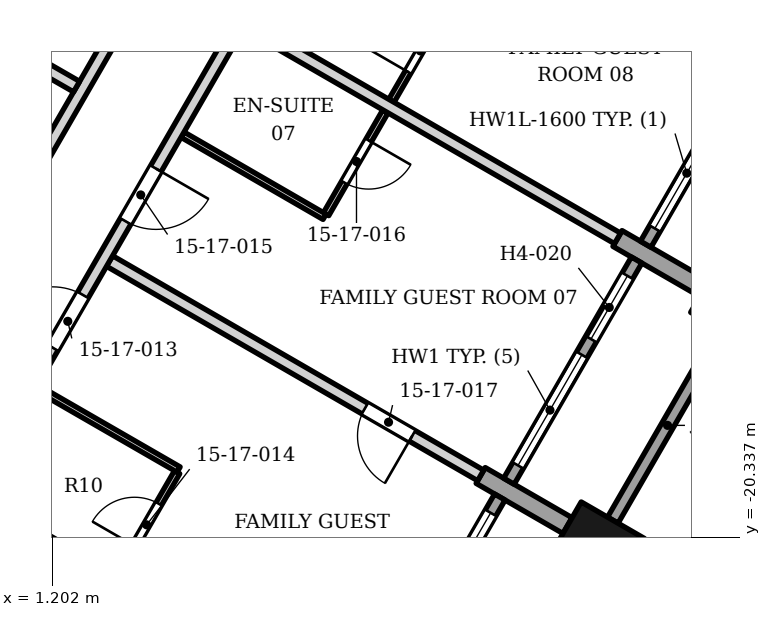
"""IFC4 building model, lengths in metres.
Left out: names, types, materials, properties, quantities, classifications, styles, units other than length and angle.
Written with IfcOpenShell. Run it as: python <this file> out.ifc"""

import sys

from ifc_helpers import new_model, si_unit, direction, frame, frame_2d, origin, origin_2d, place, context, subcontext, project, spatial, rectangle, extrude, element, fill, save


model = new_model("IFC4")
c1 = context("Model", 3, precision=1e-05, world=origin(), true_north=direction((0.0, 1.0)))
c2 = subcontext(c1, "Body", "Model", "MODEL_VIEW")
j1 = project(units=[si_unit("LENGTHUNIT", "METRE"), si_unit("PLANEANGLEUNIT", "RADIAN")], contexts=[c1])
p1 = place(None, origin())
s1 = spatial("IfcSite", under=j1, at=p1, CompositionType="ELEMENT")
p2 = place(p1, origin())
s2 = spatial("IfcBuilding", under=s1, at=p2, CompositionType="ELEMENT")
p3 = place(p2, frame((0.0, 0.0, 76.6)))
s3 = spatial("IfcBuildingStorey", under=s2, at=p3, CompositionType="ELEMENT", Elevation=76.6)
p4 = place(p3, frame((10.197, -20.443, 0.0), z_axis=(0.0, 0.0, 1.0), x_axis=(0.5, 0.866025403784, 0.0)))
e1 = element("IfcColumn", 1, at=p4, inside=s3, PredefinedType="COLUMN", context=c2, shape_type="SweptSolid", body=[
    extrude(rectangle(XDim=0.9, YDim=1.2, at=origin_2d()), origin(), (0.0, 0.0, 1.0), 3.4),
])
p5 = place(p3, frame((9.678, -20.143, 0.0), z_axis=(0.0, 0.0, 1.0), x_axis=(-0.866003217194, 0.500038426333, 0.0)))
e2 = element("IfcWall", 2, at=p5, inside=s3, PredefinedType="SOLIDWALL", context=c2, shape_type="SweptSolid", body=[
    extrude(rectangle(XDim=1.65, YDim=0.3, at=frame_2d((0.825, 0.0))), origin(), (0.0, 0.0, 1.0), 2.628),
])
p6 = place(p3, frame((11.928, -16.245, 0.0), z_axis=(0.0, 0.0, 1.0), x_axis=(0.865955154139, -0.50012165622, 0.0)))
e3 = element("IfcWall", 3, at=p6, inside=s3, PredefinedType="SOLIDWALL", context=c2, shape_type="SweptSolid", body=[
    extrude(rectangle(XDim=1.2, YDim=0.9, at=frame_2d((0.6, 0.0))), origin(), (0.0, 0.0, 1.0), 2.63),
])
p7 = place(p3, frame((10.499, -15.42, 0.0), z_axis=(0.0, 0.0, 1.0), x_axis=(0.866040211805, -0.499974350878, 0.0)))
e4 = element("IfcWall", 4, at=p7, inside=s3, PredefinedType="SOLIDWALL", context=c2, shape_type="SweptSolid", body=[
    extrude(rectangle(XDim=1.65, YDim=0.3, at=frame_2d((0.825, 0.0))), origin(), (0.0, 0.0, 1.0), 2.65),
])
p8 = place(p3, frame((6.464, -23.31, 0.0), z_axis=(0.0, 0.0, 1.0), x_axis=(0.500002543286, 0.866023935413, 0.0)))
e5 = element("IfcWall", 5, at=p8, inside=s3, PredefinedType="ELEMENTEDWALL", context=c2, shape_type="SweptSolid", body=[
    extrude(rectangle(XDim=4.2, YDim=0.2, at=frame_2d((2.1, 0.0))), origin(), (0.0, 0.0, 1.0), 2.473),
])
p9 = place(p8, frame((0.3, 0.0, 0.6)))
e6 = element("IfcOpeningElement", 6, at=p9, cuts=e5, PredefinedType="OPENING", context=c2, shape_type="SweptSolid", body=[
    extrude(rectangle(XDim=2.1, YDim=1.77, at=frame_2d((1.05, 0.885))), frame((0.0, 0.11, 0.0), z_axis=(0.0, -1.0, 0.0), x_axis=(1.0, 0.0, 0.0)), (0.0, 0.0, 1.0), 0.22),
])
p10 = place(p8, frame((2.7, 0.0, 0.0)))
e7 = element("IfcOpeningElement", 7, at=p10, cuts=e5, PredefinedType="OPENING", context=c2, shape_type="SweptSolid", body=[
    extrude(rectangle(XDim=1.2, YDim=2.37, at=frame_2d((0.6, 1.185))), frame((0.0, 0.11, 0.0), z_axis=(0.0, -1.0, 0.0), x_axis=(1.0, 0.0, 0.0)), (0.0, 0.0, 1.0), 0.22),
])
p11 = place(p3, frame((10.422, -20.053, 0.0), z_axis=(0.0, 0.0, 1.0), x_axis=(0.500012057535, 0.866018442252, 0.0)))
e8 = element("IfcWall", 8, at=p11, inside=s3, PredefinedType="SOLIDWALL", context=c2, shape_type="SweptSolid", body=[
    extrude(rectangle(XDim=3.6, YDim=0.2, at=frame_2d((1.8, 0.0))), origin(), (0.0, 0.0, 1.0), 2.63),
])
p12 = place(p3, frame((8.714, -19.413, 0.0), z_axis=(0.0, 0.0, 1.0), x_axis=(0.500027713859, 0.866009402589, 0.0)))
e9 = element("IfcWall", 9, at=p12, inside=s3, PredefinedType="ELEMENTEDWALL", context=c2, shape_type="SweptSolid", body=[
    extrude(rectangle(XDim=4.2, YDim=0.2, at=frame_2d((2.1, 0.0))), origin(), (0.0, 0.0, 1.0), 2.628),
])
p13 = place(p12, frame((0.3, 0.0, 0.6)))
e10 = element("IfcOpeningElement", 10, at=p13, cuts=e9, PredefinedType="OPENING", context=c2, shape_type="SweptSolid", body=[
    extrude(rectangle(XDim=2.1, YDim=1.8, at=frame_2d((1.05, 0.9))), frame((0.0, 0.11, 0.0), z_axis=(0.0, -1.0, 0.0), x_axis=(1.0, 0.0, 0.0)), (0.0, 0.0, 1.0), 0.22),
])
p14 = place(p12, frame((2.7, 0.0, 0.0)))
e11 = element("IfcOpeningElement", 11, at=p14, cuts=e9, PredefinedType="OPENING", context=c2, shape_type="SweptSolid", body=[
    extrude(rectangle(XDim=1.2, YDim=2.4, at=frame_2d((0.6, 1.2))), frame((0.0, 0.11, 0.0), z_axis=(0.0, -1.0, 0.0), x_axis=(1.0, 0.0, 0.0)), (0.0, 0.0, 1.0), 0.22),
])
p15 = place(p3, frame((10.964, -15.516, 0.0), z_axis=(0.0, 0.0, 1.0), x_axis=(0.500002543286, 0.866023935413, 0.0)))
e12 = element("IfcWall", 12, at=p15, inside=s3, PredefinedType="ELEMENTEDWALL", context=c2, shape_type="SweptSolid", body=[
    extrude(rectangle(XDim=4.2, YDim=0.2, at=frame_2d((2.1, 0.0))), origin(), (0.0, 0.0, 1.0), 2.302),
])
p16 = place(p15, frame((0.3, 0.0, 0.6)))
e13 = element("IfcOpeningElement", 13, at=p16, cuts=e12, PredefinedType="OPENING", context=c2, shape_type="SweptSolid", body=[
    extrude(rectangle(XDim=2.1, YDim=1.6, at=frame_2d((1.05, 0.8))), frame((0.0, 0.11, 0.0), z_axis=(0.0, -1.0, 0.0), x_axis=(1.0, 0.0, 0.0)), (0.0, 0.0, 1.0), 0.22),
])
p17 = place(p15, frame((2.7, 0.0, 0.0)))
e14 = element("IfcOpeningElement", 14, at=p17, cuts=e12, PredefinedType="OPENING", context=c2, shape_type="SweptSolid", body=[
    extrude(rectangle(XDim=1.2, YDim=2.2, at=frame_2d((0.6, 1.1))), frame((0.0, 0.11, 0.0), z_axis=(0.0, -1.0, 0.0), x_axis=(1.0, 0.0, 0.0)), (0.0, 0.0, 1.0), 0.22),
])
p18 = place(p3, frame((2.28, -20.952, 0.0), z_axis=(0.0, 0.0, 1.0), x_axis=(0.500675951608, 0.865634791053, 0.0)))
e15 = element("IfcWall", 15, at=p18, inside=s3, PredefinedType="PARTITIONING", context=c2, shape_type="SweptSolid", body=[
    extrude(rectangle(XDim=1.95, YDim=0.1, at=frame_2d((0.975, 0.0))), origin(), (0.0, 0.0, 1.0), 2.384),
])
p19 = place(p18, frame((0.55, 0.0, 0.0)))
e16 = element("IfcOpeningElement", 16, at=p19, cuts=e15, PredefinedType="OPENING", context=c2, shape_type="SweptSolid", body=[
    extrude(rectangle(XDim=0.8, YDim=2.1, at=frame_2d((0.4, 1.05))), frame((0.0, 0.06, 0.0), z_axis=(0.0, -1.0, 0.0), x_axis=(1.0, 0.0, 0.0)), (0.0, 0.0, 1.0), 0.12),
])
p20 = place(p3, frame((-0.193, -19.64, 0.0), z_axis=(0.0, 0.0, 1.0), x_axis=(0.866036131362, -0.49998141883, 0.0)))
e17 = element("IfcWall", 17, at=p20, inside=s3, PredefinedType="PARTITIONING", context=c2, shape_type="SweptSolid", body=[
    extrude(rectangle(XDim=2.802, YDim=0.2, at=frame_2d((1.401, 0.0))), origin(), (0.0, 0.0, 1.0), 2.384),
])
p21 = place(p3, frame((0.943, -17.873, 0.0), z_axis=(0.0, 0.0, 1.0), x_axis=(0.866339109022, -0.499456252518, 0.0)))
e18 = element("IfcWall", 18, at=p21, inside=s3, PredefinedType="PARTITIONING", context=c2, shape_type="SweptSolid", body=[
    extrude(rectangle(XDim=2.7, YDim=0.1, at=frame_2d((1.35, 0.0))), origin(), (0.0, 0.0, 1.0), 2.384),
])
p22 = place(p3, frame((-0.029, -15.955, 0.0), z_axis=(0.0, 0.0, 1.0), x_axis=(0.499541892375, 0.866289730842, 0.0)))
e19 = element("IfcWall", 19, at=p22, inside=s3, PredefinedType="PARTITIONING", context=c2, shape_type="SweptSolid", body=[
    extrude(rectangle(XDim=13.93, YDim=0.2, at=frame_2d((6.965, 0.0))), origin(), (0.0, 0.0, 1.0), 2.242),
])
p23 = place(p22, frame((1.27, 0.0, 0.0)))
e20 = element("IfcOpeningElement", 20, at=p23, cuts=e19, PredefinedType="OPENING", context=c2, shape_type="SweptSolid", body=[
    extrude(rectangle(XDim=0.9, YDim=2.1, at=frame_2d((0.45, 1.05))), frame((0.0, 0.11, 0.0), z_axis=(0.0, -1.0, 0.0), x_axis=(1.0, 0.0, 0.0)), (0.0, 0.0, 1.0), 0.22),
])
p24 = place(p22, frame((8.235, 0.0, 0.0)))
e21 = element("IfcOpeningElement", 21, at=p24, cuts=e19, PredefinedType="OPENING", context=c2, shape_type="SweptSolid", body=[
    extrude(rectangle(XDim=0.9, YDim=2.1, at=frame_2d((0.45, 1.05))), frame((0.0, 0.11, 0.0), z_axis=(0.0, -1.0, 0.0), x_axis=(1.0, 0.0, 0.0)), (0.0, 0.0, 1.0), 0.22),
])
p25 = place(p3, frame((2.145, -15.791, 0.0), z_axis=(0.0, 0.0, 1.0), x_axis=(0.865906406618, -0.500206052519, 0.0)))
e22 = element("IfcWall", 22, at=p25, inside=s3, PredefinedType="PARTITIONING", context=c2, shape_type="SweptSolid", body=[
    extrude(rectangle(XDim=7.05, YDim=0.2, at=frame_2d((3.525, 0.0))), origin(), (0.0, 0.0, 1.0), 2.384),
])
p26 = place(p25, frame((4.85, 0.0, 0.0)))
e23 = element("IfcOpeningElement", 23, at=p26, cuts=e22, PredefinedType="OPENING", context=c2, shape_type="SweptSolid", body=[
    extrude(rectangle(XDim=0.9, YDim=2.1, at=frame_2d((0.45, 1.05))), frame((0.0, 0.11, 0.0), z_axis=(0.0, -1.0, 0.0), x_axis=(1.0, 0.0, 0.0)), (0.0, 0.0, 1.0), 0.22),
])
p27 = place(p3, frame((5.707, -15.021, 0.0), z_axis=(0.0, 0.0, 1.0), x_axis=(0.49995005938, 0.866054235095, 0.0)))
e24 = element("IfcWall", 24, at=p27, inside=s3, PredefinedType="PARTITIONING", context=c2, shape_type="SweptSolid", body=[
    extrude(rectangle(XDim=1.95, YDim=0.1, at=frame_2d((0.975, 0.0))), origin(), (0.0, 0.0, 1.0), 2.473),
])
p28 = place(p27, frame((0.6, 0.0, 0.0)))
e25 = element("IfcOpeningElement", 25, at=p28, cuts=e24, PredefinedType="OPENING", context=c2, shape_type="SweptSolid", body=[
    extrude(rectangle(XDim=0.8, YDim=2.1, at=frame_2d((0.4, 1.05))), frame((0.0, 0.06, 0.0), z_axis=(0.0, -1.0, 0.0), x_axis=(1.0, 0.0, 0.0)), (0.0, 0.0, 1.0), 0.12),
])
p29 = place(p3, frame((3.344, -13.713, 0.0), z_axis=(0.0, 0.0, 1.0), x_axis=(0.86571095196, -0.500544251447, 0.0)))
e26 = element("IfcWall", 26, at=p29, inside=s3, PredefinedType="PARTITIONING", context=c2, shape_type="SweptSolid", body=[
    extrude(rectangle(XDim=2.7, YDim=0.1, at=frame_2d((1.35, 0.0))), origin(), (0.0, 0.0, 1.0), 2.384),
])
p30 = place(p3, frame((6.781, -13.158, 0.0), z_axis=(0.0, 0.0, 1.0), x_axis=(0.50063639091, 0.865657671425, 0.0)))
e27 = element("IfcWall", 27, at=p30, inside=s3, PredefinedType="PARTITIONING", context=c2, shape_type="SweptSolid", body=[
    extrude(rectangle(XDim=1.95, YDim=0.1, at=frame_2d((0.975, 0.0))), origin(), (0.0, 0.0, 1.0), 2.242),
])
p31 = place(p30, frame((0.55, 0.0, 0.0)))
e28 = element("IfcOpeningElement", 28, at=p31, cuts=e27, PredefinedType="OPENING", context=c2, shape_type="SweptSolid", body=[
    extrude(rectangle(XDim=0.8, YDim=2.1, at=frame_2d((0.4, 1.05))), frame((0.0, 0.06, 0.0), z_axis=(0.0, -1.0, 0.0), x_axis=(1.0, 0.0, 0.0)), (0.0, 0.0, 1.0), 0.12),
])
p32 = place(p3, frame((0.85, -12.49, 0.0), z_axis=(0.0, 0.0, 1.0), x_axis=(0.866960927484, -0.498376113207, 0.0)))
e29 = element("IfcWall", 29, at=p32, inside=s3, PredefinedType="PARTITIONING", context=c2, shape_type="SweptSolid", body=[
    extrude(rectangle(XDim=0.869, YDim=0.2, at=frame_2d((0.435, 0.0))), origin(), (0.0, 0.0, 1.0), 3.23),
])
p33 = place(p3, frame((4.395, -11.894, 0.0), z_axis=(0.0, 0.0, 1.0), x_axis=(0.866031034943, -0.499990246421, 0.0)))
e30 = element("IfcWall", 30, at=p33, inside=s3, PredefinedType="PARTITIONING", context=c2, shape_type="SweptSolid", body=[
    extrude(rectangle(XDim=7.05, YDim=0.2, at=frame_2d((3.525, 0.0))), origin(), (0.0, 0.0, 1.0), 2.302),
])
p34 = place(p3, frame((0.859, -17.822, 0.0), z_axis=(0.0, 0.0, 1.0), x_axis=(0.500002395808, 0.866024020559, 0.0)))
e31 = element("IfcWall", 31, at=p34, inside=s3, PredefinedType="PARTITIONING", context=c2, shape_type="SweptSolid", body=[
    extrude(rectangle(XDim=23.0, YDim=0.2, at=frame_2d((11.5, 0.0))), origin(), (0.0, 0.0, 1.0), 2.242),
])
p35 = place(p34, frame((0.7, 0.0, 0.0)))
e32 = element("IfcOpeningElement", 32, at=p35, cuts=e31, PredefinedType="OPENING", context=c2, shape_type="SweptSolid", body=[
    extrude(rectangle(XDim=1.0, YDim=2.1, at=frame_2d((0.5, 1.05))), frame((0.0, 0.11, 0.0), z_axis=(0.0, -1.0, 0.0), x_axis=(1.0, 0.0, 0.0)), (0.0, 0.0, 1.0), 0.22),
])
p36 = place(p34, frame((3.1, 0.0, 0.0)))
e33 = element("IfcOpeningElement", 33, at=p36, cuts=e31, PredefinedType="OPENING", context=c2, shape_type="SweptSolid", body=[
    extrude(rectangle(XDim=1.0, YDim=2.1, at=frame_2d((0.5, 1.05))), frame((0.0, 0.11, 0.0), z_axis=(0.0, -1.0, 0.0), x_axis=(1.0, 0.0, 0.0)), (0.0, 0.0, 1.0), 0.22),
])
p37 = place(p34, frame((9.7, 0.0, 0.0)))
e34 = element("IfcOpeningElement", 34, at=p37, cuts=e31, PredefinedType="OPENING", context=c2, shape_type="SweptSolid", body=[
    extrude(rectangle(XDim=1.0, YDim=2.1, at=frame_2d((0.5, 1.05))), frame((0.0, 0.11, 0.0), z_axis=(0.0, -1.0, 0.0), x_axis=(1.0, 0.0, 0.0)), (0.0, 0.0, 1.0), 0.22),
])
p38 = place(p34, frame((12.1, 0.0, 0.0)))
e35 = element("IfcOpeningElement", 35, at=p38, cuts=e31, PredefinedType="OPENING", context=c2, shape_type="SweptSolid", body=[
    extrude(rectangle(XDim=1.0, YDim=2.1, at=frame_2d((0.5, 1.05))), frame((0.0, 0.11, 0.0), z_axis=(0.0, -1.0, 0.0), x_axis=(1.0, 0.0, 0.0)), (0.0, 0.0, 1.0), 0.22),
])
p39 = place(p34, frame((16.6, 0.0, 0.0)))
e36 = element("IfcOpeningElement", 36, at=p39, cuts=e31, PredefinedType="OPENING", context=c2, shape_type="SweptSolid", body=[
    extrude(rectangle(XDim=1.0, YDim=2.1, at=frame_2d((0.5, 1.05))), frame((0.0, 0.11, 0.0), z_axis=(0.0, -1.0, 0.0), x_axis=(1.0, 0.0, 0.0)), (0.0, 0.0, 1.0), 0.22),
])
p40 = place(p10, origin())
e37 = element("IfcDoor", 37, at=p40, inside=s3, OperationType="SINGLE_SWING_LEFT", PredefinedType="DOOR", context=c2, shape_type="SweptSolid", body=[
    extrude(rectangle(XDim=1.2, YDim=2.37, at=frame_2d((0.6, 1.185))), frame((0.0, 0.025, 0.0), z_axis=(0.0, -1.0, 0.0), x_axis=(1.0, 0.0, 0.0)), (0.0, 0.0, 1.0), 0.05),
])
fill(e7, e37)
p41 = place(p13, origin())
e38 = element("IfcWindow", 38, at=p41, inside=s3, PartitioningType="SINGLE_PANEL", PredefinedType="WINDOW", context=c2, shape_type="SweptSolid", body=[
    extrude(rectangle(XDim=2.1, YDim=1.8, at=frame_2d((1.05, 0.9))), frame((0.0, 0.03, 0.0), z_axis=(0.0, -1.0, 0.0), x_axis=(1.0, 0.0, 0.0)), (0.0, 0.0, 1.0), 0.06),
])
fill(e10, e38)
p42 = place(p14, origin())
e39 = element("IfcDoor", 39, at=p42, inside=s3, OperationType="SINGLE_SWING_LEFT", PredefinedType="DOOR", context=c2, shape_type="SweptSolid", body=[
    extrude(rectangle(XDim=1.2, YDim=2.4, at=frame_2d((0.6, 1.2))), frame((0.0, 0.025, 0.0), z_axis=(0.0, -1.0, 0.0), x_axis=(1.0, 0.0, 0.0)), (0.0, 0.0, 1.0), 0.05),
])
fill(e11, e39)
p43 = place(p16, origin())
e40 = element("IfcWindow", 40, at=p43, inside=s3, PartitioningType="SINGLE_PANEL", PredefinedType="WINDOW", context=c2, shape_type="SweptSolid", body=[
    extrude(rectangle(XDim=2.1, YDim=1.6, at=frame_2d((1.05, 0.8))), frame((0.0, 0.03, 0.0), z_axis=(0.0, -1.0, 0.0), x_axis=(1.0, 0.0, 0.0)), (0.0, 0.0, 1.0), 0.06),
])
fill(e13, e40)
p44 = place(p35, origin())
e41 = element("IfcDoor", 41, at=p44, inside=s3, OperationType="SINGLE_SWING_LEFT", PredefinedType="DOOR", context=c2, shape_type="SweptSolid", body=[
    extrude(rectangle(XDim=1.0, YDim=2.1, at=frame_2d((0.5, 1.05))), frame((0.0, 0.025, 0.0), z_axis=(0.0, -1.0, 0.0), x_axis=(1.0, 0.0, 0.0)), (0.0, 0.0, 1.0), 0.05),
])
fill(e32, e41)
p45 = place(p19, origin())
e42 = element("IfcDoor", 42, at=p45, inside=s3, OperationType="SINGLE_SWING_LEFT", PredefinedType="DOOR", context=c2, shape_type="SweptSolid", body=[
    extrude(rectangle(XDim=0.8, YDim=2.1, at=frame_2d((0.4, 1.05))), frame((0.0, 0.025, 0.0), z_axis=(0.0, -1.0, 0.0), x_axis=(1.0, 0.0, 0.0)), (0.0, 0.0, 1.0), 0.05),
])
fill(e16, e42)
p46 = place(p36, origin())
e43 = element("IfcDoor", 43, at=p46, inside=s3, OperationType="SINGLE_SWING_RIGHT", PredefinedType="DOOR", context=c2, shape_type="SweptSolid", body=[
    extrude(rectangle(XDim=1.0, YDim=2.1, at=frame_2d((0.5, 1.05))), frame((0.0, 0.025, 0.0), z_axis=(0.0, -1.0, 0.0), x_axis=(1.0, 0.0, 0.0)), (0.0, 0.0, 1.0), 0.05),
])
fill(e33, e43)
p47 = place(p28, origin())
e44 = element("IfcDoor", 44, at=p47, inside=s3, OperationType="SINGLE_SWING_RIGHT", PredefinedType="DOOR", context=c2, shape_type="SweptSolid", body=[
    extrude(rectangle(XDim=0.8, YDim=2.1, at=frame_2d((0.4, 1.05))), frame((0.0, 0.025, 0.0), z_axis=(0.0, -1.0, 0.0), x_axis=(1.0, 0.0, 0.0)), (0.0, 0.0, 1.0), 0.05),
])
fill(e25, e44)
p48 = place(p26, origin())
e45 = element("IfcDoor", 45, at=p48, inside=s3, OperationType="SINGLE_SWING_RIGHT", PredefinedType="DOOR", context=c2, shape_type="SweptSolid", body=[
    extrude(rectangle(XDim=0.9, YDim=2.1, at=frame_2d((0.45, 1.05))), frame((0.0, 0.025, 0.0), z_axis=(0.0, -1.0, 0.0), x_axis=(1.0, 0.0, 0.0)), (0.0, 0.0, 1.0), 0.05),
])
fill(e23, e45)
p49 = place(p31, origin())
e46 = element("IfcDoor", 46, at=p49, inside=s3, OperationType="SINGLE_SWING_LEFT", PredefinedType="DOOR", context=c2, shape_type="SweptSolid", body=[
    extrude(rectangle(XDim=0.8, YDim=2.1, at=frame_2d((0.4, 1.05))), frame((0.0, 0.025, 0.0), z_axis=(0.0, -1.0, 0.0), x_axis=(1.0, 0.0, 0.0)), (0.0, 0.0, 1.0), 0.05),
])
fill(e28, e46)
save(model, sys.argv[1])
